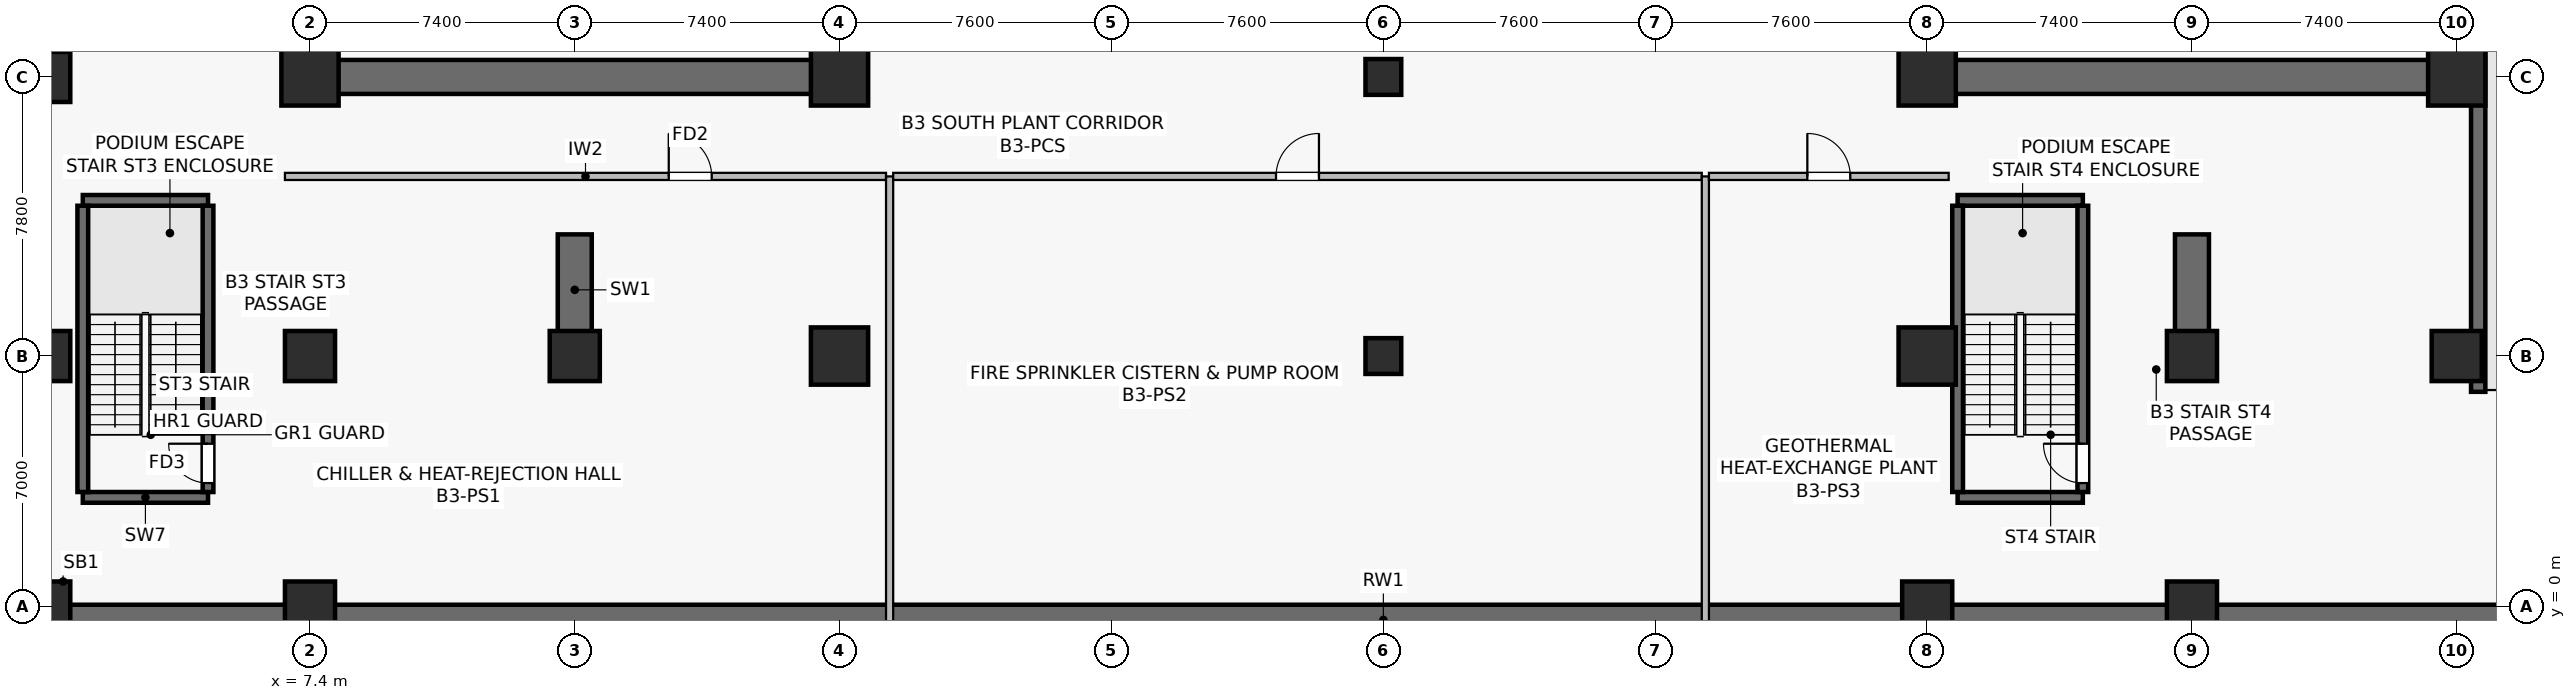
"""IFC4 building model, lengths in metres.
Left out: names, types, materials, properties, quantities, classifications, styles, units other than length and angle.
Written with IfcOpenShell. Run it as: python <this file> out.ifc"""

import sys

from ifc_helpers import new_model, si_unit, direction, frame, frame_2d, origin, origin_2d, place, context, subcontext, project, spatial, rectangle, extrude, source, transform, mapped, element, fill, save


model = new_model("IFC4")
c1 = context("Model", 3, precision=1e-05, world=origin(), true_north=direction((0.0, 1.0)))
c2 = subcontext(c1, "Body", "Model", "MODEL_VIEW")
j1 = project(units=[si_unit("LENGTHUNIT", "METRE"), si_unit("PLANEANGLEUNIT", "RADIAN")], contexts=[c1])
p1 = place(None, origin())
s1 = spatial("IfcSite", under=j1, at=p1, CompositionType="ELEMENT")
p2 = place(p1, origin())
s2 = spatial("IfcBuilding", under=s1, at=p2, CompositionType="ELEMENT")
p3 = place(p2, frame((0.0, 0.0, -14.4)))
s3 = spatial("IfcBuildingStorey", under=s2, at=p3, CompositionType="ELEMENT", Elevation=-14.4)
p4 = place(p3, frame((6.925, 14.8, 0.0), z_axis=(0.0, 0.0, 1.0), x_axis=(1.0, 0.0, 0.0)))
e1 = element("IfcWall", 1, at=p4, inside=s3, PredefinedType="SHEAR", context=c2, shape_type="SweptSolid", body=[
    extrude(rectangle(XDim=15.75, YDim=0.95, at=frame_2d((7.875, 0.0))), origin(), (0.0, 0.0, 1.0), 4.42),
])
p5 = place(p3, frame((7.4, 15.275, 0.0), z_axis=(0.0, 0.0, 1.0), x_axis=(0.0, 1.0, 0.0)))
e2 = element("IfcWall", 2, at=p5, inside=s3, PredefinedType="SHEAR", context=c2, shape_type="SweptSolid", body=[
    extrude(rectangle(XDim=18.05, YDim=0.95, at=frame_2d((9.025, 0.0))), origin(), (0.0, 0.0, 1.0), 4.42),
])
p6 = place(p3, frame((22.2, 15.275, 0.0), z_axis=(0.0, 0.0, 1.0), x_axis=(0.0, 1.0, 0.0)))
e3 = element("IfcWall", 3, at=p6, inside=s3, PredefinedType="SHEAR", context=c2, shape_type="SweptSolid", body=[
    extrude(rectangle(XDim=18.05, YDim=0.95, at=frame_2d((9.025, 0.0))), origin(), (0.0, 0.0, 1.0), 4.42),
])
p7 = place(p6, frame((3.275, 0.0, 0.0)))
e4 = element("IfcOpeningElement", 4, at=p7, cuts=e3, PredefinedType="OPENING", context=c2, shape_type="SweptSolid", body=[
    extrude(rectangle(XDim=1.42, YDim=2.2, at=frame_2d((0.71, 1.1))), frame((0.0, 0.485, 0.0), z_axis=(0.0, -1.0, 0.0), x_axis=(1.0, 0.0, 0.0)), (0.0, 0.0, 1.0), 0.97),
])
p8 = place(p3, frame((52.125, 14.8, 0.0), z_axis=(0.0, 0.0, 1.0), x_axis=(1.0, 0.0, 0.0)))
e5 = element("IfcWall", 5, at=p8, inside=s3, PredefinedType="SHEAR", context=c2, shape_type="SweptSolid", body=[
    extrude(rectangle(XDim=15.75, YDim=0.95, at=frame_2d((7.875, 0.0))), origin(), (0.0, 0.0, 1.0), 4.42),
])
p9 = place(p3, frame((52.6, 15.275, 0.0), z_axis=(0.0, 0.0, 1.0), x_axis=(0.0, 1.0, 0.0)))
e6 = element("IfcWall", 6, at=p9, inside=s3, PredefinedType="SHEAR", context=c2, shape_type="SweptSolid", body=[
    extrude(rectangle(XDim=18.05, YDim=0.95, at=frame_2d((9.025, 0.0))), origin(), (0.0, 0.0, 1.0), 4.42),
])
p10 = place(p9, frame((3.275, 0.0, 0.0)))
e7 = element("IfcOpeningElement", 7, at=p10, cuts=e6, PredefinedType="OPENING", context=c2, shape_type="SweptSolid", body=[
    extrude(rectangle(XDim=1.42, YDim=2.2, at=frame_2d((0.71, 1.1))), frame((0.0, 0.485, 0.0), z_axis=(0.0, -1.0, 0.0), x_axis=(1.0, 0.0, 0.0)), (0.0, 0.0, 1.0), 0.97),
])
p11 = place(p3, frame((67.4, 15.275, 0.0), z_axis=(0.0, 0.0, 1.0), x_axis=(0.0, 1.0, 0.0)))
e8 = element("IfcWall", 8, at=p11, inside=s3, PredefinedType="SHEAR", context=c2, shape_type="SweptSolid", body=[
    extrude(rectangle(XDim=18.05, YDim=0.95, at=frame_2d((9.025, 0.0))), origin(), (0.0, 0.0, 1.0), 4.42),
])
for number, where, z_axis, x_axis in (
    (9, (1.05, 3.05, 0.0), (0.0, 0.0, 1.0), (1.0, 0.0, 0.0)),
    (10, (1.05, 11.35, 0.0), (0.0, 0.0, 1.0), (1.0, 0.0, 0.0)),
):
    element("IfcWall", number, at=place(p3, frame(where, z_axis=z_axis, x_axis=x_axis)), inside=s3, PredefinedType="SHEAR", context=c2, shape_type="SweptSolid", body=[
        extrude(rectangle(XDim=3.5, YDim=0.3, at=frame_2d((1.75, 0.0))), origin(), (0.0, 0.0, 1.0), 4.42),
    ])
p12 = place(p3, frame((1.05, 3.2, 0.0), z_axis=(0.0, 0.0, 1.0), x_axis=(0.0, 1.0, 0.0)))
e11 = element("IfcWall", 11, at=p12, inside=s3, PredefinedType="SHEAR", context=c2, shape_type="SweptSolid", body=[
    extrude(rectangle(XDim=8.0, YDim=0.3, at=frame_2d((4.0, 0.0))), origin(), (0.0, 0.0, 1.0), 4.42),
])
p13 = place(p3, frame((4.55, 3.2, 0.0), z_axis=(0.0, 0.0, 1.0), x_axis=(0.0, 1.0, 0.0)))
e12 = element("IfcWall", 12, at=p13, inside=s3, PredefinedType="SHEAR", context=c2, shape_type="SweptSolid", body=[
    extrude(rectangle(XDim=8.0, YDim=0.3, at=frame_2d((4.0, 0.0))), origin(), (0.0, 0.0, 1.0), 4.42),
])
p14 = place(p13, frame((0.25, 0.0, 0.0)))
e13 = element("IfcOpeningElement", 13, at=p14, cuts=e12, PredefinedType="OPENING", context=c2, shape_type="SweptSolid", body=[
    extrude(rectangle(XDim=1.1, YDim=2.15, at=frame_2d((0.55, 1.075))), frame((0.0, 0.16, 0.0), z_axis=(0.0, -1.0, 0.0), x_axis=(1.0, 0.0, 0.0)), (0.0, 0.0, 1.0), 0.32),
])
for number, where, z_axis, x_axis in (
    (14, (53.45, 3.05, 0.0), (0.0, 0.0, 1.0), (1.0, 0.0, 0.0)),
    (15, (53.45, 11.35, 0.0), (0.0, 0.0, 1.0), (1.0, 0.0, 0.0)),
):
    element("IfcWall", number, at=place(p3, frame(where, z_axis=z_axis, x_axis=x_axis)), inside=s3, PredefinedType="SHEAR", context=c2, shape_type="SweptSolid", body=[
        extrude(rectangle(XDim=3.5, YDim=0.3, at=frame_2d((1.75, 0.0))), origin(), (0.0, 0.0, 1.0), 4.42),
    ])
p15 = place(p3, frame((53.45, 3.2, 0.0), z_axis=(0.0, 0.0, 1.0), x_axis=(0.0, 1.0, 0.0)))
e16 = element("IfcWall", 16, at=p15, inside=s3, PredefinedType="SHEAR", context=c2, shape_type="SweptSolid", body=[
    extrude(rectangle(XDim=8.0, YDim=0.3, at=frame_2d((4.0, 0.0))), origin(), (0.0, 0.0, 1.0), 4.42),
])
p16 = place(p3, frame((56.95, 3.2, 0.0), z_axis=(0.0, 0.0, 1.0), x_axis=(0.0, 1.0, 0.0)))
e17 = element("IfcWall", 17, at=p16, inside=s3, PredefinedType="SHEAR", context=c2, shape_type="SweptSolid", body=[
    extrude(rectangle(XDim=8.0, YDim=0.3, at=frame_2d((4.0, 0.0))), origin(), (0.0, 0.0, 1.0), 4.42),
])
p17 = place(p16, frame((0.25, 0.0, 0.0)))
e18 = element("IfcOpeningElement", 18, at=p17, cuts=e17, PredefinedType="OPENING", context=c2, shape_type="SweptSolid", body=[
    extrude(rectangle(XDim=1.1, YDim=2.15, at=frame_2d((0.55, 1.075))), frame((0.0, 0.16, 0.0), z_axis=(0.0, -1.0, 0.0), x_axis=(1.0, 0.0, 0.0)), (0.0, 0.0, 1.0), 0.32),
])
for number, where, z_axis, x_axis in (
    (19, (14.8, 7.3, 0.0), (0.0, 0.0, 1.0), (0.0, 1.0, 0.0)),
    (20, (60.0, 7.3, 0.0), (0.0, 0.0, 1.0), (0.0, 1.0, 0.0)),
):
    element("IfcWall", number, at=place(p3, frame(where, z_axis=z_axis, x_axis=x_axis)), inside=s3, PredefinedType="SHEAR", context=c2, shape_type="SweptSolid", body=[
        extrude(rectangle(XDim=3.1, YDim=0.95, at=frame_2d((1.55, 0.0))), origin(), (0.0, 0.0, 1.0), 4.42),
    ])
p18 = place(p3, frame((-1.0, -0.375, 0.0), z_axis=(0.0, 0.0, 1.0), x_axis=(1.0, 0.0, 0.0)))
e21 = element("IfcWall", 21, at=p18, inside=s3, PredefinedType="SOLIDWALL", context=c2, shape_type="SweptSolid", body=[
    extrude(rectangle(XDim=76.8, YDim=0.85, at=frame_2d((38.4, 0.0))), origin(), (0.0, 0.0, 1.0), 4.42),
])
p19 = place(p3, frame((68.0, 6.0, 0.0), z_axis=(0.0, 0.0, 1.0), x_axis=(0.0, 1.0, 0.0)))
e22 = element("IfcWall", 22, at=p19, inside=s3, PredefinedType="SHEAR", context=c2, shape_type="SweptSolid", body=[
    extrude(rectangle(XDim=40.4, YDim=0.4, at=frame_2d((20.2, 0.0))), origin(), (0.0, 0.0, 1.0), 4.42),
])
m1 = source(origin(), c2, "Body", "SweptSolid", [
    extrude(rectangle(XDim=1.4, YDim=1.4, at=origin_2d()), origin(), (0.0, 0.0, 1.0), 4.8),
])
p20 = place(p3, frame((14.8, 7.0, 0.0), z_axis=(0.0, 0.0, 1.0), x_axis=(1.0, 0.0, 0.0)))
e23 = element("IfcColumn", 23, at=p20, inside=s3, PredefinedType="COLUMN", context=c2, shape_type="MappedRepresentation", body=[
    mapped(m1, transform((0.0, 0.0, 0.0), scale=1.0)),
])
m2 = source(origin(), c2, "Body", "SweptSolid", [
    extrude(rectangle(XDim=1.6, YDim=1.6, at=origin_2d()), origin(), (0.0, 0.0, 1.0), 4.8),
])
for number, where, z_axis, x_axis in (
    (24, (22.2, 7.0, 0.0), (0.0, 0.0, 1.0), (1.0, 0.0, 0.0)),
    (25, (7.4, 14.8, 0.0), (0.0, 0.0, 1.0), (1.0, 0.0, 0.0)),
    (26, (22.2, 14.8, 0.0), (0.0, 0.0, 1.0), (1.0, 0.0, 0.0)),
    (27, (52.6, 7.0, 0.0), (0.0, 0.0, 1.0), (1.0, 0.0, 0.0)),
):
    element("IfcColumn", number, at=place(p3, frame(where, z_axis=z_axis, x_axis=x_axis)), inside=s3, PredefinedType="COLUMN", context=c2, shape_type="MappedRepresentation", body=[
        mapped(m2, transform((0.0, 0.0, 0.0), scale=1.0)),
    ])
p21 = place(p3, frame((60.0, 7.0, 0.0), z_axis=(0.0, 0.0, 1.0), x_axis=(1.0, 0.0, 0.0)))
e28 = element("IfcColumn", 28, at=p21, inside=s3, PredefinedType="COLUMN", context=c2, shape_type="MappedRepresentation", body=[
    mapped(m1, transform((0.0, 0.0, 0.0), scale=1.0)),
])
for number, where, z_axis, x_axis in (
    (29, (52.6, 14.8, 0.0), (0.0, 0.0, 1.0), (1.0, 0.0, 0.0)),
    (30, (67.4, 14.8, 0.0), (0.0, 0.0, 1.0), (1.0, 0.0, 0.0)),
):
    element("IfcColumn", number, at=place(p3, frame(where, z_axis=z_axis, x_axis=x_axis)), inside=s3, PredefinedType="COLUMN", context=c2, shape_type="MappedRepresentation", body=[
        mapped(m2, transform((0.0, 0.0, 0.0), scale=1.0)),
    ])
for number, where, z_axis, x_axis in (
    (31, (7.4, 7.0, 0.0), (0.0, 0.0, 1.0), (1.0, 0.0, 0.0)),
    (32, (67.4, 7.0, 0.0), (0.0, 0.0, 1.0), (1.0, 0.0, 0.0)),
    (33, (0.0, 7.0, 0.0), (0.0, 0.0, 1.0), (1.0, 0.0, 0.0)),
    (34, (0.0, 14.8, 0.0), (0.0, 0.0, 1.0), (1.0, 0.0, 0.0)),
):
    element("IfcColumn", number, at=place(p3, frame(where, z_axis=z_axis, x_axis=x_axis)), inside=s3, PredefinedType="COLUMN", context=c2, shape_type="MappedRepresentation", body=[
        mapped(m1, transform((0.0, 0.0, 0.0), scale=1.0)),
    ])
m3 = source(origin(), c2, "Body", "SweptSolid", [
    extrude(rectangle(XDim=1.0, YDim=1.0, at=origin_2d()), origin(), (0.0, 0.0, 1.0), 4.8),
])
for number, where, z_axis, x_axis in (
    (35, (37.4, 7.0, 0.0), (0.0, 0.0, 1.0), (1.0, 0.0, 0.0)),
    (36, (37.4, 14.8, 0.0), (0.0, 0.0, 1.0), (1.0, 0.0, 0.0)),
):
    element("IfcColumn", number, at=place(p3, frame(where, z_axis=z_axis, x_axis=x_axis)), inside=s3, PredefinedType="COLUMN", context=c2, shape_type="MappedRepresentation", body=[
        mapped(m3, transform((0.0, 0.0, 0.0), scale=1.0)),
    ])
for number, where, z_axis, x_axis in (
    (37, (0.0, 0.0, 0.0), (0.0, 0.0, 1.0), (1.0, 0.0, 0.0)),
    (38, (7.4, 0.0, 0.0), (0.0, 0.0, 1.0), (1.0, 0.0, 0.0)),
    (39, (52.6, 0.0, 0.0), (0.0, 0.0, 1.0), (1.0, 0.0, 0.0)),
    (40, (60.0, 0.0, 0.0), (0.0, 0.0, 1.0), (1.0, 0.0, 0.0)),
):
    element("IfcColumn", number, at=place(p3, frame(where, z_axis=z_axis, x_axis=x_axis)), inside=s3, PredefinedType="COLUMN", context=c2, shape_type="MappedRepresentation", body=[
        mapped(m1, transform((0.0, 0.0, 0.0), scale=1.0)),
    ])
p22 = place(p3, frame((6.7, 12.02, 0.0), z_axis=(0.0, 0.0, 1.0), x_axis=(1.0, 0.0, 0.0)))
e41 = element("IfcWall", 41, at=p22, inside=s3, PredefinedType="SOLIDWALL", context=c2, shape_type="SweptSolid", body=[
    extrude(rectangle(XDim=16.8, YDim=0.2, at=frame_2d((8.4, 0.0))), origin(), (0.0, 0.0, 1.0), 3.655),
])
p23 = place(p22, frame((10.727, 0.0, 0.0)))
e42 = element("IfcOpeningElement", 42, at=p23, cuts=e41, PredefinedType="OPENING", context=c2, shape_type="SweptSolid", body=[
    extrude(rectangle(XDim=1.2, YDim=2.16, at=frame_2d((0.6, 1.08))), frame((0.0, 0.11, 0.0), z_axis=(0.0, -1.0, 0.0), x_axis=(1.0, 0.0, 0.0)), (0.0, 0.0, 1.0), 0.22),
])
p24 = place(p3, frame((23.6, -0.69, 0.0), z_axis=(0.0, 0.0, 1.0), x_axis=(0.0, 1.0, 0.0)))
e43 = element("IfcWall", 43, at=p24, inside=s3, PredefinedType="SOLIDWALL", context=c2, shape_type="SweptSolid", body=[
    extrude(rectangle(XDim=12.71, YDim=0.2, at=frame_2d((6.355, 0.0))), origin(), (0.0, 0.0, 1.0), 3.605),
])
p25 = place(p3, frame((23.7, 12.02, 0.0), z_axis=(0.0, 0.0, 1.0), x_axis=(1.0, 0.0, 0.0)))
e44 = element("IfcWall", 44, at=p25, inside=s3, PredefinedType="SOLIDWALL", context=c2, shape_type="SweptSolid", body=[
    extrude(rectangle(XDim=22.6, YDim=0.2, at=frame_2d((11.3, 0.0))), origin(), (0.0, 0.0, 1.0), 3.655),
])
p26 = place(p25, frame((10.7, 0.0, 0.0)))
e45 = element("IfcOpeningElement", 45, at=p26, cuts=e44, PredefinedType="OPENING", context=c2, shape_type="SweptSolid", body=[
    extrude(rectangle(XDim=1.2, YDim=2.16, at=frame_2d((0.6, 1.08))), frame((0.0, 0.11, 0.0), z_axis=(0.0, -1.0, 0.0), x_axis=(1.0, 0.0, 0.0)), (0.0, 0.0, 1.0), 0.22),
])
p27 = place(p3, frame((46.4, -0.69, 0.0), z_axis=(0.0, 0.0, 1.0), x_axis=(0.0, 1.0, 0.0)))
e46 = element("IfcWall", 46, at=p27, inside=s3, PredefinedType="SOLIDWALL", context=c2, shape_type="SweptSolid", body=[
    extrude(rectangle(XDim=12.71, YDim=0.2, at=frame_2d((6.355, 0.0))), origin(), (0.0, 0.0, 1.0), 3.605),
])
p28 = place(p3, frame((46.5, 12.02, 0.0), z_axis=(0.0, 0.0, 1.0), x_axis=(1.0, 0.0, 0.0)))
e47 = element("IfcWall", 47, at=p28, inside=s3, PredefinedType="SOLIDWALL", context=c2, shape_type="SweptSolid", body=[
    extrude(rectangle(XDim=6.7, YDim=0.2, at=frame_2d((3.35, 0.0))), origin(), (0.0, 0.0, 1.0), 3.655),
])
p29 = place(p28, frame((2.75, 0.0, 0.0)))
e48 = element("IfcOpeningElement", 48, at=p29, cuts=e47, PredefinedType="OPENING", context=c2, shape_type="SweptSolid", body=[
    extrude(rectangle(XDim=1.2, YDim=2.16, at=frame_2d((0.6, 1.08))), frame((0.0, 0.11, 0.0), z_axis=(0.0, -1.0, 0.0), x_axis=(1.0, 0.0, 0.0)), (0.0, 0.0, 1.0), 0.22),
])
m4 = source(origin(), c2, "Body", "SweptSolid", [
    extrude(rectangle(XDim=1.1, YDim=2.15, at=frame_2d((0.55, 1.075))), frame((0.0, 0.025, 0.0), z_axis=(0.0, -1.0, 0.0), x_axis=(1.0, 0.0, 0.0)), (0.0, 0.0, 1.0), 0.05),
])
p30 = place(p14, origin())
e49 = element("IfcDoor", 49, at=p30, inside=s3, OperationType="SINGLE_SWING_RIGHT", PredefinedType="DOOR", context=c2, shape_type="MappedRepresentation", body=[
    mapped(m4, transform((0.0, 0.0, 0.0), scale=1.0)),
])
fill(e13, e49)
p31 = place(p17, origin())
e50 = element("IfcDoor", 50, at=p31, inside=s3, OperationType="SINGLE_SWING_RIGHT", PredefinedType="DOOR", context=c2, shape_type="MappedRepresentation", body=[
    mapped(m4, transform((0.0, 0.0, 0.0), scale=1.0)),
])
fill(e18, e50)
m5 = source(origin(), c2, "Body", "SweptSolid", [
    extrude(rectangle(XDim=1.2, YDim=2.16, at=frame_2d((0.6, 1.08))), frame((0.0, 0.025, 0.0), z_axis=(0.0, -1.0, 0.0), x_axis=(1.0, 0.0, 0.0)), (0.0, 0.0, 1.0), 0.05),
])
p32 = place(p23, origin())
e51 = element("IfcDoor", 51, at=p32, inside=s3, OperationType="SINGLE_SWING_LEFT", PredefinedType="DOOR", context=c2, shape_type="MappedRepresentation", body=[
    mapped(m5, transform((0.0, 0.0, 0.0), scale=1.0)),
])
fill(e42, e51)
p33 = place(p26, origin())
e52 = element("IfcDoor", 52, at=p33, inside=s3, OperationType="SINGLE_SWING_RIGHT", PredefinedType="DOOR", context=c2, shape_type="MappedRepresentation", body=[
    mapped(m5, transform((0.0, 0.0, 0.0), scale=1.0)),
])
fill(e45, e52)
p34 = place(p29, origin())
e53 = element("IfcDoor", 53, at=p34, inside=s3, OperationType="SINGLE_SWING_LEFT", PredefinedType="DOOR", context=c2, shape_type="MappedRepresentation", body=[
    mapped(m5, transform((0.0, 0.0, 0.0), scale=1.0)),
])
fill(e48, e53)
save(model, sys.argv[1])
